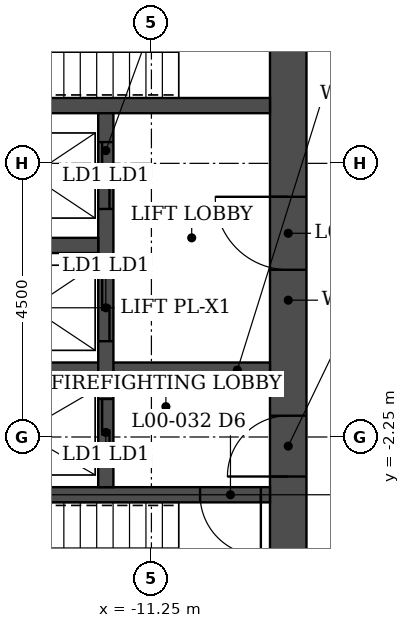
"""IFC4 building model, lengths in metres.
Left out: names, types, materials, properties, quantities, classifications, styles, units other than length and angle.
Written with IfcOpenShell. Run it as: python <this file> out.ifc"""

import sys

from ifc_helpers import new_model, si_unit, direction, frame, frame_2d, origin, place, context, subcontext, project, spatial, rectangle, extrude, element, fill, save


model = new_model("IFC4")
c1 = context("Model", 3, precision=1e-05, world=origin(), true_north=direction((0.0, 1.0)))
c2 = subcontext(c1, "Body", "Model", "MODEL_VIEW")
j1 = project(units=[si_unit("LENGTHUNIT", "METRE"), si_unit("PLANEANGLEUNIT", "RADIAN")], contexts=[c1])
p1 = place(None, origin())
s1 = spatial("IfcSite", under=j1, at=p1, CompositionType="ELEMENT")
p2 = place(p1, origin())
s2 = spatial("IfcBuilding", under=s1, at=p2, CompositionType="ELEMENT")
p3 = place(p2, origin())
s3 = spatial("IfcBuildingStorey", under=s2, at=p3, CompositionType="ELEMENT", Elevation=0.0)
p4 = place(p3, frame((-9.0, -6.45, 0.0), z_axis=(0.0, 0.0, 1.0), x_axis=(0.0, 1.0, 0.0)))
e1 = element("IfcWall", 1, at=p4, inside=s3, PredefinedType="SHEAR", context=c2, shape_type="SweptSolid", body=[
    extrude(rectangle(XDim=12.9, YDim=0.6, at=frame_2d((6.45, 0.0))), origin(), (0.0, 0.0, 1.0), 6.0),
])
p5 = place(p4, frame((3.55, 0.0, 0.0)))
e2 = element("IfcOpeningElement", 2, at=p5, cuts=e1, PredefinedType="OPENING", context=c2, shape_type="SweptSolid", body=[
    extrude(rectangle(XDim=1.0, YDim=2.1, at=frame_2d((0.5, 1.05))), frame((0.0, 0.31, 0.0), z_axis=(0.0, -1.0, 0.0), x_axis=(1.0, 0.0, 0.0)), (0.0, 0.0, 1.0), 0.62),
])
p6 = place(p4, frame((6.95, 0.0, 0.0)))
e3 = element("IfcOpeningElement", 3, at=p6, cuts=e1, PredefinedType="OPENING", context=c2, shape_type="SweptSolid", body=[
    extrude(rectangle(XDim=1.2, YDim=2.1, at=frame_2d((0.6, 1.05))), frame((0.0, 0.31, 0.0), z_axis=(0.0, -1.0, 0.0), x_axis=(1.0, 0.0, 0.0)), (0.0, 0.0, 1.0), 0.62),
])
p7 = place(p4, frame((10.85, 0.0, 0.0)))
e4 = element("IfcOpeningElement", 4, at=p7, cuts=e1, PredefinedType="OPENING", context=c2, shape_type="SweptSolid", body=[
    extrude(rectangle(XDim=1.0, YDim=2.1, at=frame_2d((0.5, 1.05))), frame((0.0, 0.31, 0.0), z_axis=(0.0, -1.0, 0.0), x_axis=(1.0, 0.0, 0.0)), (0.0, 0.0, 1.0), 0.62),
])
p8 = place(p3, frame((-9.3, -3.2, 0.0), z_axis=(0.0, 0.0, 1.0), x_axis=(-1.0, 0.0, 0.0)))
e5 = element("IfcWall", 5, at=p8, inside=s3, PredefinedType="SHEAR", context=c2, shape_type="SweptSolid", body=[
    extrude(rectangle(XDim=8.4, YDim=0.25, at=frame_2d((4.2, 0.0))), origin(), (0.0, 0.0, 1.0), 6.0),
])
p9 = place(p8, frame((0.15, 0.0, 0.0)))
e6 = element("IfcOpeningElement", 6, at=p9, cuts=e5, PredefinedType="OPENING", context=c2, shape_type="SweptSolid", body=[
    extrude(rectangle(XDim=1.0, YDim=2.1, at=frame_2d((0.5, 1.05))), frame((0.0, 0.135, 0.0), z_axis=(0.0, -1.0, 0.0), x_axis=(1.0, 0.0, 0.0)), (0.0, 0.0, 1.0), 0.27),
])
p10 = place(p3, frame((-9.3, 3.2, 0.0), z_axis=(0.0, 0.0, 1.0), x_axis=(-1.0, 0.0, 0.0)))
e7 = element("IfcWall", 7, at=p10, inside=s3, PredefinedType="SHEAR", context=c2, shape_type="SweptSolid", body=[
    extrude(rectangle(XDim=8.4, YDim=0.25, at=frame_2d((4.2, 0.0))), origin(), (0.0, 0.0, 1.0), 6.0),
])
p11 = place(p3, frame((-9.3, -1.15, 0.0), z_axis=(0.0, 0.0, 1.0), x_axis=(-1.0, 0.0, 0.0)))
e8 = element("IfcWall", 8, at=p11, inside=s3, PredefinedType="SHEAR", context=c2, shape_type="SweptSolid", body=[
    extrude(rectangle(XDim=5.375, YDim=0.25, at=frame_2d((2.688, 0.0))), origin(), (0.0, 0.0, 1.0), 6.0),
])
p12 = place(p3, frame((-12.0, -3.075, 0.0), z_axis=(0.0, 0.0, 1.0), x_axis=(0.0, 1.0, 0.0)))
e9 = element("IfcWall", 9, at=p12, inside=s3, PredefinedType="SHEAR", context=c2, shape_type="SweptSolid", body=[
    extrude(rectangle(XDim=6.15, YDim=0.25, at=frame_2d((3.075, 0.0))), origin(), (0.0, 0.0, 1.0), 6.0),
])
p13 = place(p12, frame((0.35, 0.0, 0.0)))
e10 = element("IfcOpeningElement", 10, at=p13, cuts=e9, PredefinedType="OPENING", context=c2, shape_type="SweptSolid", body=[
    extrude(rectangle(XDim=1.1, YDim=2.1, at=frame_2d((0.55, 1.05))), frame((0.0, 0.135, 0.0), z_axis=(0.0, -1.0, 0.0), x_axis=(1.0, 0.0, 0.0)), (0.0, 0.0, 1.0), 0.27),
])
p14 = place(p12, frame((2.4, 0.0, 0.0)))
e11 = element("IfcOpeningElement", 11, at=p14, cuts=e9, PredefinedType="OPENING", context=c2, shape_type="SweptSolid", body=[
    extrude(rectangle(XDim=1.1, YDim=2.1, at=frame_2d((0.55, 1.05))), frame((0.0, 0.135, 0.0), z_axis=(0.0, -1.0, 0.0), x_axis=(1.0, 0.0, 0.0)), (0.0, 0.0, 1.0), 0.27),
])
p15 = place(p12, frame((4.575, 0.0, 0.0)))
e12 = element("IfcOpeningElement", 12, at=p15, cuts=e9, PredefinedType="OPENING", context=c2, shape_type="SweptSolid", body=[
    extrude(rectangle(XDim=1.1, YDim=2.1, at=frame_2d((0.55, 1.05))), frame((0.0, 0.135, 0.0), z_axis=(0.0, -1.0, 0.0), x_axis=(1.0, 0.0, 0.0)), (0.0, 0.0, 1.0), 0.27),
])
p16 = place(p3, frame((-12.125, 0.9, 0.0), z_axis=(0.0, 0.0, 1.0), x_axis=(-1.0, 0.0, 0.0)))
e13 = element("IfcWall", 13, at=p16, inside=s3, PredefinedType="SHEAR", context=c2, shape_type="SweptSolid", body=[
    extrude(rectangle(XDim=2.55, YDim=0.25, at=frame_2d((1.275, 0.0))), origin(), (0.0, 0.0, 1.0), 6.0),
])
p17 = place(p5, origin())
e14 = element("IfcDoor", 14, at=p17, inside=s3, OperationType="SINGLE_SWING_LEFT", PredefinedType="DOOR", context=c2, shape_type="SweptSolid", body=[
    extrude(rectangle(XDim=1.0, YDim=2.1, at=frame_2d((0.5, 1.05))), frame((0.0, 0.025, 0.0), z_axis=(0.0, -1.0, 0.0), x_axis=(1.0, 0.0, 0.0)), (0.0, 0.0, 1.0), 0.05),
])
fill(e2, e14)
p18 = place(p9, origin())
e15 = element("IfcDoor", 15, at=p18, inside=s3, OperationType="SINGLE_SWING_LEFT", PredefinedType="DOOR", context=c2, shape_type="SweptSolid", body=[
    extrude(rectangle(XDim=1.0, YDim=2.1, at=frame_2d((0.5, 1.05))), frame((0.0, 0.025, 0.0), z_axis=(0.0, -1.0, 0.0), x_axis=(1.0, 0.0, 0.0)), (0.0, 0.0, 1.0), 0.05),
])
fill(e6, e15)
p19 = place(p6, origin())
e16 = element("IfcDoor", 16, at=p19, inside=s3, OperationType="SINGLE_SWING_RIGHT", PredefinedType="DOOR", context=c2, shape_type="SweptSolid", body=[
    extrude(rectangle(XDim=1.2, YDim=2.1, at=frame_2d((0.6, 1.05))), frame((0.0, 0.025, 0.0), z_axis=(0.0, -1.0, 0.0), x_axis=(1.0, 0.0, 0.0)), (0.0, 0.0, 1.0), 0.05),
])
fill(e3, e16)
p20 = place(p13, origin())
e17 = element("IfcDoor", 17, at=p20, inside=s3, OperationType="DOUBLE_DOOR_SLIDING", PredefinedType="DOOR", context=c2, shape_type="SweptSolid", body=[
    extrude(rectangle(XDim=1.1, YDim=2.1, at=frame_2d((0.55, 1.05))), frame((0.0, 0.025, 0.0), z_axis=(0.0, -1.0, 0.0), x_axis=(1.0, 0.0, 0.0)), (0.0, 0.0, 1.0), 0.05),
])
fill(e10, e17)
p21 = place(p14, origin())
e18 = element("IfcDoor", 18, at=p21, inside=s3, OperationType="DOUBLE_DOOR_SLIDING", PredefinedType="DOOR", context=c2, shape_type="SweptSolid", body=[
    extrude(rectangle(XDim=1.1, YDim=2.1, at=frame_2d((0.55, 1.05))), frame((0.0, 0.025, 0.0), z_axis=(0.0, -1.0, 0.0), x_axis=(1.0, 0.0, 0.0)), (0.0, 0.0, 1.0), 0.05),
])
fill(e11, e18)
p22 = place(p15, origin())
e19 = element("IfcDoor", 19, at=p22, inside=s3, OperationType="DOUBLE_DOOR_SLIDING", PredefinedType="DOOR", context=c2, shape_type="SweptSolid", body=[
    extrude(rectangle(XDim=1.1, YDim=2.1, at=frame_2d((0.55, 1.05))), frame((0.0, 0.025, 0.0), z_axis=(0.0, -1.0, 0.0), x_axis=(1.0, 0.0, 0.0)), (0.0, 0.0, 1.0), 0.05),
])
fill(e12, e19)
save(model, sys.argv[1])
